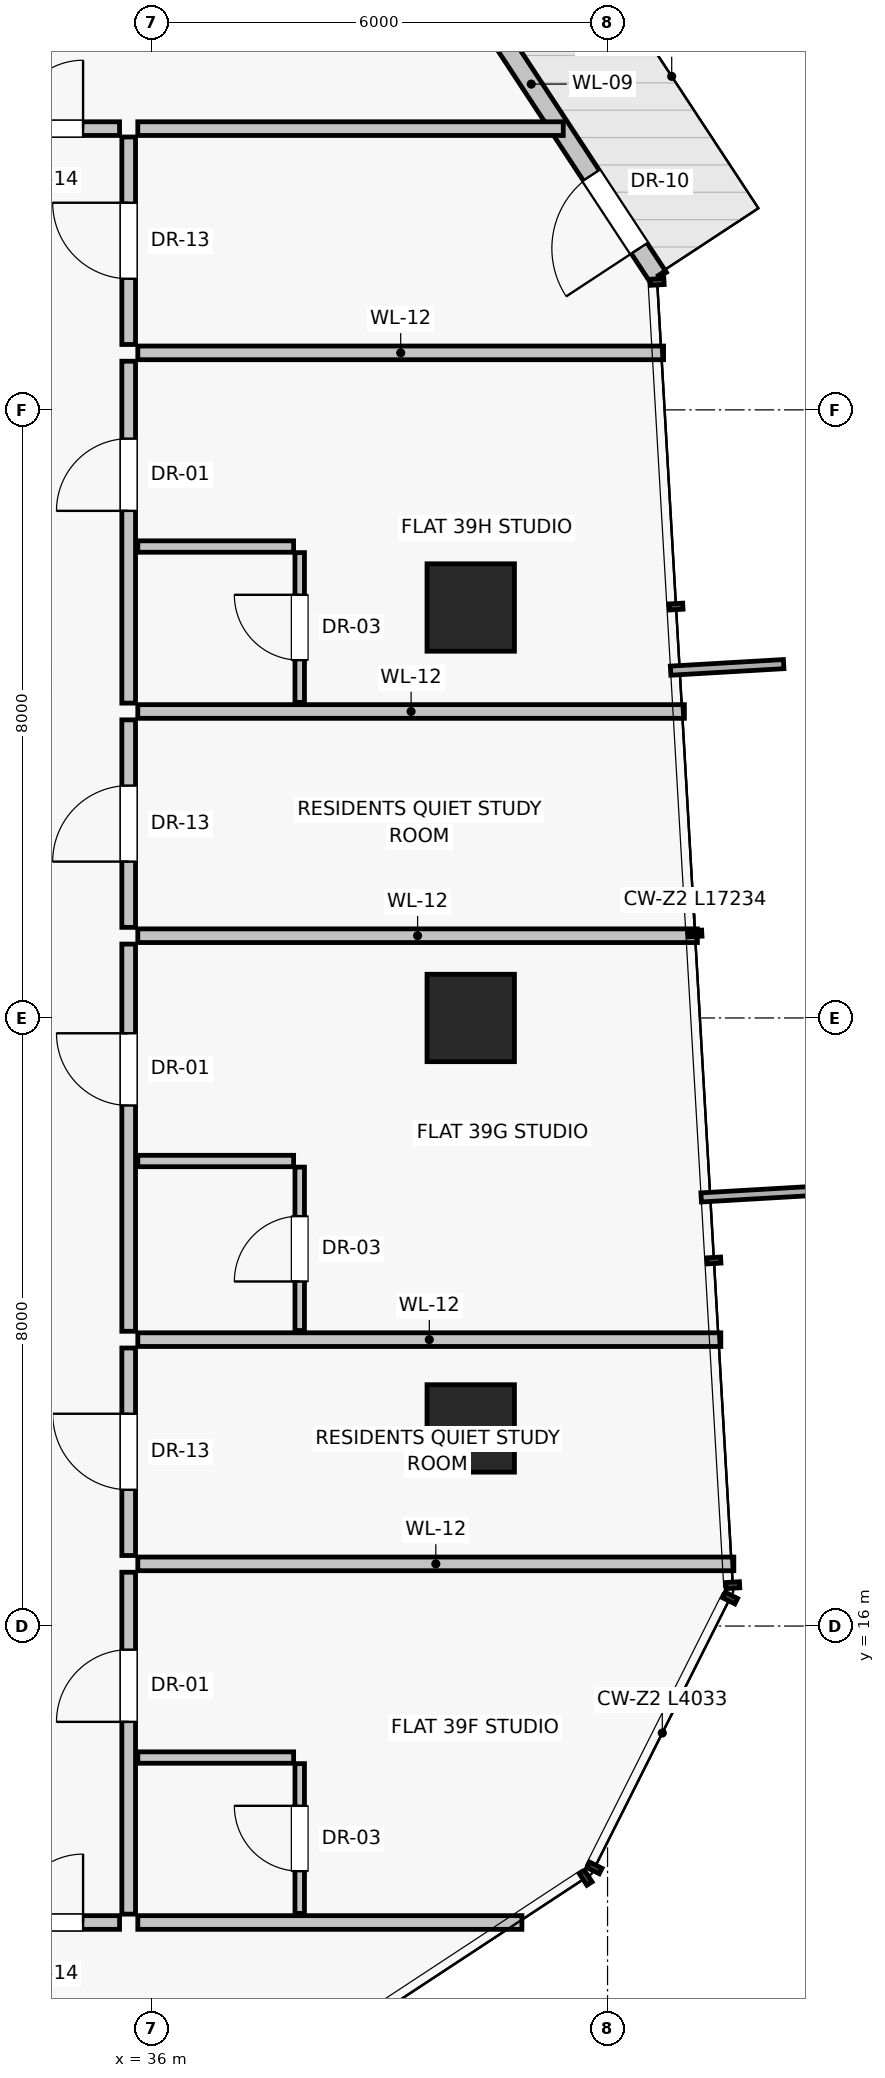
"""IFC4 building model, lengths in metres.
Left out: names, types, materials, properties, quantities, classifications, styles, units other than length and angle.
Written with IfcOpenShell. Run it as: python <this file> out.ifc"""

import sys

from ifc_helpers import new_model, si_unit, direction, frame, frame_2d, origin, origin_2d, place, context, subcontext, project, spatial, rectangle, extrude, source, transform, mapped, element, fill, save


model = new_model("IFC4")
c1 = context("Model", 3, precision=1e-05, world=origin(), true_north=direction((0.0, 1.0)))
c2 = subcontext(c1, "Body", "Model", "MODEL_VIEW")
j1 = project(units=[si_unit("LENGTHUNIT", "METRE"), si_unit("PLANEANGLEUNIT", "RADIAN")], contexts=[c1])
p1 = place(None, origin())
s1 = spatial("IfcSite", under=j1, at=p1, CompositionType="ELEMENT")
p2 = place(p1, origin())
s2 = spatial("IfcBuilding", under=s1, at=p2, CompositionType="ELEMENT")
p3 = place(p2, frame((0.0, 0.0, 139.25)))
s3 = spatial("IfcBuildingStorey", under=s2, at=p3, CompositionType="ELEMENT", Elevation=139.25)
for number, where, z_axis, x_axis in (
    (1, (40.2, 18.6, 0.0), (0.0, 0.0, 1.0), (1.0, 0.0, 0.0)),
    (2, (40.2, 24.0, 0.0), (0.0, 0.0, 1.0), (1.0, 0.0, 0.0)),
    (3, (40.2, 29.4, 0.0), (0.0, 0.0, 1.0), (1.0, 0.0, 0.0)),
):
    element("IfcColumn", number, at=place(p3, frame(where, z_axis=z_axis, x_axis=x_axis)), inside=s3, PredefinedType="COLUMN", context=c2, shape_type="SweptSolid", body=[
        extrude(rectangle(XDim=1.15, YDim=1.15, at=origin_2d()), origin(), (0.0, 0.0, 1.0), 3.25),
    ])
p4 = place(p3, frame((42.67, 33.74, 0.0), z_axis=(0.0, 0.0, 1.0), x_axis=(-0.54932518159, 0.835608667303, 0.0)))
e4 = element("IfcWall", 4, at=p4, inside=s3, PredefinedType="SOLIDWALL", context=c2, shape_type="SweptSolid", body=[
    extrude(rectangle(XDim=4.233, YDim=0.25, at=frame_2d((2.117, 0.0))), origin(), (0.0, 0.0, 1.0), 3.0),
])
p5 = place(p4, frame((0.46, 0.0, 0.0)))
e5 = element("IfcOpeningElement", 5, at=p5, cuts=e4, PredefinedType="OPENING", context=c2, shape_type="SweptSolid", body=[
    extrude(rectangle(XDim=1.15, YDim=2.25, at=frame_2d((0.575, 1.125))), frame((0.0, 0.135, 0.0), z_axis=(0.0, -1.0, 0.0), x_axis=(1.0, 0.0, 0.0)), (0.0, 0.0, 1.0), 0.27),
])
p6 = place(p3, frame((35.82, 12.1, 0.0), z_axis=(0.0, 0.0, 1.0), x_axis=(1.0, 0.0, 0.0)))
e6 = element("IfcWall", 6, at=p6, inside=s3, PredefinedType="PARTITIONING", context=c2, shape_type="SweptSolid", body=[
    extrude(rectangle(XDim=5.053, YDim=0.18, at=frame_2d((2.527, 0.0))), origin(), (0.0, 0.0, 1.0), 3.0),
])
p7 = place(p3, frame((35.82, 35.7, 0.0), z_axis=(0.0, 0.0, 1.0), x_axis=(1.0, 0.0, 0.0)))
e7 = element("IfcWall", 7, at=p7, inside=s3, PredefinedType="PARTITIONING", context=c2, shape_type="SweptSolid", body=[
    extrude(rectangle(XDim=5.597, YDim=0.18, at=frame_2d((2.799, 0.0))), origin(), (0.0, 0.0, 1.0), 3.0),
])
p8 = place(p3, frame((35.7, 16.928, 0.0), z_axis=(0.0, 0.0, 1.0), x_axis=(0.0, 1.0, 0.0)))
e8 = element("IfcWall", 8, at=p8, inside=s3, PredefinedType="PARTITIONING", context=c2, shape_type="SweptSolid", body=[
    extrude(rectangle(XDim=2.73, YDim=0.18, at=frame_2d((1.365, 0.0))), origin(), (0.0, 0.0, 1.0), 2.58),
])
p9 = place(p8, frame((0.865, 0.0, 0.0)))
e9 = element("IfcOpeningElement", 9, at=p9, cuts=e8, PredefinedType="OPENING", context=c2, shape_type="SweptSolid", body=[
    extrude(rectangle(XDim=1.0, YDim=2.01, at=frame_2d((0.5, 1.005))), frame((0.0, 0.1, 0.0), z_axis=(0.0, -1.0, 0.0), x_axis=(1.0, 0.0, 0.0)), (0.0, 0.0, 1.0), 0.2),
])
p10 = place(p3, frame((35.82, 16.818, 0.0), z_axis=(0.0, 0.0, 1.0), x_axis=(1.0, 0.0, 0.0)))
e10 = element("IfcWall", 10, at=p10, inside=s3, PredefinedType="PARTITIONING", context=c2, shape_type="SweptSolid", body=[
    extrude(rectangle(XDim=7.841, YDim=0.18, at=frame_2d((3.921, 0.0))), origin(), (0.0, 0.0, 1.0), 3.0),
])
p11 = place(p3, frame((35.7, 12.21, 0.0), z_axis=(0.0, 0.0, 1.0), x_axis=(0.0, 1.0, 0.0)))
e11 = element("IfcWall", 11, at=p11, inside=s3, PredefinedType="PARTITIONING", context=c2, shape_type="SweptSolid", body=[
    extrude(rectangle(XDim=4.498, YDim=0.18, at=frame_2d((2.249, 0.0))), origin(), (0.0, 0.0, 1.0), 3.0),
])
p12 = place(p11, frame((2.53, 0.0, 0.0)))
e12 = element("IfcOpeningElement", 12, at=p12, cuts=e11, PredefinedType="OPENING", context=c2, shape_type="SweptSolid", body=[
    extrude(rectangle(XDim=0.95, YDim=2.02, at=frame_2d((0.475, 1.01))), frame((0.0, 0.1, 0.0), z_axis=(0.0, -1.0, 0.0), x_axis=(1.0, 0.0, 0.0)), (0.0, 0.0, 1.0), 0.2),
])
p13 = place(p3, frame((35.82, 14.27, 0.0), z_axis=(0.0, 0.0, 1.0), x_axis=(1.0, 0.0, 0.0)))
e13 = element("IfcWall", 13, at=p13, inside=s3, PredefinedType="PARTITIONING", context=c2, shape_type="SweptSolid", body=[
    extrude(rectangle(XDim=2.05, YDim=0.15, at=frame_2d((1.025, 0.0))), origin(), (0.0, 0.0, 1.0), 3.0),
])
p14 = place(p3, frame((37.95, 12.22, 0.0), z_axis=(0.0, 0.0, 1.0), x_axis=(0.0, 1.0, 0.0)))
e14 = element("IfcWall", 14, at=p14, inside=s3, PredefinedType="PARTITIONING", context=c2, shape_type="SweptSolid", body=[
    extrude(rectangle(XDim=1.97, YDim=0.125, at=frame_2d((0.985, 0.0))), origin(), (0.0, 0.0, 1.0), 3.0),
])
p15 = place(p14, frame((0.555, 0.0, 0.0)))
e15 = element("IfcOpeningElement", 15, at=p15, cuts=e14, PredefinedType="OPENING", context=c2, shape_type="SweptSolid", body=[
    extrude(rectangle(XDim=0.86, YDim=2.01, at=frame_2d((0.43, 1.005))), frame((0.0, 0.073, 0.0), z_axis=(0.0, -1.0, 0.0), x_axis=(1.0, 0.0, 0.0)), (0.0, 0.0, 1.0), 0.145),
])
p16 = place(p3, frame((35.82, 19.768, 0.0), z_axis=(0.0, 0.0, 1.0), x_axis=(1.0, 0.0, 0.0)))
e16 = element("IfcWall", 16, at=p16, inside=s3, PredefinedType="PARTITIONING", context=c2, shape_type="SweptSolid", body=[
    extrude(rectangle(XDim=7.67, YDim=0.18, at=frame_2d((3.835, 0.0))), origin(), (0.0, 0.0, 1.0), 3.0),
])
p17 = place(p3, frame((35.7, 25.192, 0.0), z_axis=(0.0, 0.0, 1.0), x_axis=(0.0, 1.0, 0.0)))
e17 = element("IfcWall", 17, at=p17, inside=s3, PredefinedType="PARTITIONING", context=c2, shape_type="SweptSolid", body=[
    extrude(rectangle(XDim=2.73, YDim=0.18, at=frame_2d((1.365, 0.0))), origin(), (0.0, 0.0, 1.0), 2.58),
])
p18 = place(p17, frame((0.865, 0.0, 0.0)))
e18 = element("IfcOpeningElement", 18, at=p18, cuts=e17, PredefinedType="OPENING", context=c2, shape_type="SweptSolid", body=[
    extrude(rectangle(XDim=1.0, YDim=2.01, at=frame_2d((0.5, 1.005))), frame((0.0, 0.1, 0.0), z_axis=(0.0, -1.0, 0.0), x_axis=(1.0, 0.0, 0.0)), (0.0, 0.0, 1.0), 0.2),
])
p19 = place(p3, frame((35.82, 25.082, 0.0), z_axis=(0.0, 0.0, 1.0), x_axis=(1.0, 0.0, 0.0)))
e19 = element("IfcWall", 19, at=p19, inside=s3, PredefinedType="PARTITIONING", context=c2, shape_type="SweptSolid", body=[
    extrude(rectangle(XDim=7.362, YDim=0.18, at=frame_2d((3.681, 0.0))), origin(), (0.0, 0.0, 1.0), 3.0),
])
p20 = place(p3, frame((35.7, 19.878, 0.0), z_axis=(0.0, 0.0, 1.0), x_axis=(0.0, 1.0, 0.0)))
e20 = element("IfcWall", 20, at=p20, inside=s3, PredefinedType="PARTITIONING", context=c2, shape_type="SweptSolid", body=[
    extrude(rectangle(XDim=5.094, YDim=0.18, at=frame_2d((2.547, 0.0))), origin(), (0.0, 0.0, 1.0), 2.58),
])
p21 = place(p20, frame((2.971, 0.0, 0.0)))
e21 = element("IfcOpeningElement", 21, at=p21, cuts=e20, PredefinedType="OPENING", context=c2, shape_type="SweptSolid", body=[
    extrude(rectangle(XDim=0.95, YDim=2.02, at=frame_2d((0.475, 1.01))), frame((0.0, 0.1, 0.0), z_axis=(0.0, -1.0, 0.0), x_axis=(1.0, 0.0, 0.0)), (0.0, 0.0, 1.0), 0.2),
])
p22 = place(p3, frame((35.82, 22.118, 0.0), z_axis=(0.0, 0.0, 1.0), x_axis=(1.0, 0.0, 0.0)))
e22 = element("IfcWall", 22, at=p22, inside=s3, PredefinedType="PARTITIONING", context=c2, shape_type="SweptSolid", body=[
    extrude(rectangle(XDim=2.05, YDim=0.15, at=frame_2d((1.025, 0.0))), origin(), (0.0, 0.0, 1.0), 3.0),
])
p23 = place(p3, frame((37.95, 19.888, 0.0), z_axis=(0.0, 0.0, 1.0), x_axis=(0.0, 1.0, 0.0)))
e23 = element("IfcWall", 23, at=p23, inside=s3, PredefinedType="PARTITIONING", context=c2, shape_type="SweptSolid", body=[
    extrude(rectangle(XDim=2.15, YDim=0.125, at=frame_2d((1.075, 0.0))), origin(), (0.0, 0.0, 1.0), 3.0),
])
p24 = place(p23, frame((0.645, 0.0, 0.0)))
e24 = element("IfcOpeningElement", 24, at=p24, cuts=e23, PredefinedType="OPENING", context=c2, shape_type="SweptSolid", body=[
    extrude(rectangle(XDim=0.86, YDim=2.01, at=frame_2d((0.43, 1.005))), frame((0.0, 0.073, 0.0), z_axis=(0.0, -1.0, 0.0), x_axis=(1.0, 0.0, 0.0)), (0.0, 0.0, 1.0), 0.145),
])
p25 = place(p3, frame((35.82, 28.032, 0.0), z_axis=(0.0, 0.0, 1.0), x_axis=(1.0, 0.0, 0.0)))
e25 = element("IfcWall", 25, at=p25, inside=s3, PredefinedType="PARTITIONING", context=c2, shape_type="SweptSolid", body=[
    extrude(rectangle(XDim=7.191, YDim=0.18, at=frame_2d((3.595, 0.0))), origin(), (0.0, 0.0, 1.0), 3.0),
])
p26 = place(p3, frame((35.7, 32.86, 0.0), z_axis=(0.0, 0.0, 1.0), x_axis=(0.0, 1.0, 0.0)))
e26 = element("IfcWall", 26, at=p26, inside=s3, PredefinedType="PARTITIONING", context=c2, shape_type="SweptSolid", body=[
    extrude(rectangle(XDim=2.73, YDim=0.18, at=frame_2d((1.365, 0.0))), origin(), (0.0, 0.0, 1.0), 3.0),
])
p27 = place(p26, frame((0.865, 0.0, 0.0)))
e27 = element("IfcOpeningElement", 27, at=p27, cuts=e26, PredefinedType="OPENING", context=c2, shape_type="SweptSolid", body=[
    extrude(rectangle(XDim=1.0, YDim=2.01, at=frame_2d((0.5, 1.005))), frame((0.0, 0.1, 0.0), z_axis=(0.0, -1.0, 0.0), x_axis=(1.0, 0.0, 0.0)), (0.0, 0.0, 1.0), 0.2),
])
p28 = place(p3, frame((35.82, 32.75, 0.0), z_axis=(0.0, 0.0, 1.0), x_axis=(1.0, 0.0, 0.0)))
e28 = element("IfcWall", 28, at=p28, inside=s3, PredefinedType="PARTITIONING", context=c2, shape_type="SweptSolid", body=[
    extrude(rectangle(XDim=6.917, YDim=0.18, at=frame_2d((3.458, 0.0))), origin(), (0.0, 0.0, 1.0), 3.0),
])
p29 = place(p3, frame((35.7, 28.142, 0.0), z_axis=(0.0, 0.0, 1.0), x_axis=(0.0, 1.0, 0.0)))
e29 = element("IfcWall", 29, at=p29, inside=s3, PredefinedType="PARTITIONING", context=c2, shape_type="SweptSolid", body=[
    extrude(rectangle(XDim=4.498, YDim=0.18, at=frame_2d((2.249, 0.0))), origin(), (0.0, 0.0, 1.0), 2.58),
])
p30 = place(p29, frame((2.53, 0.0, 0.0)))
e30 = element("IfcOpeningElement", 30, at=p30, cuts=e29, PredefinedType="OPENING", context=c2, shape_type="SweptSolid", body=[
    extrude(rectangle(XDim=0.95, YDim=2.02, at=frame_2d((0.475, 1.01))), frame((0.0, 0.1, 0.0), z_axis=(0.0, -1.0, 0.0), x_axis=(1.0, 0.0, 0.0)), (0.0, 0.0, 1.0), 0.2),
])
p31 = place(p3, frame((35.82, 30.202, 0.0), z_axis=(0.0, 0.0, 1.0), x_axis=(1.0, 0.0, 0.0)))
e31 = element("IfcWall", 31, at=p31, inside=s3, PredefinedType="PARTITIONING", context=c2, shape_type="SweptSolid", body=[
    extrude(rectangle(XDim=2.05, YDim=0.15, at=frame_2d((1.025, 0.0))), origin(), (0.0, 0.0, 1.0), 2.378),
])
p32 = place(p3, frame((37.95, 28.152, 0.0), z_axis=(0.0, 0.0, 1.0), x_axis=(0.0, 1.0, 0.0)))
e32 = element("IfcWall", 32, at=p32, inside=s3, PredefinedType="PARTITIONING", context=c2, shape_type="SweptSolid", body=[
    extrude(rectangle(XDim=1.97, YDim=0.125, at=frame_2d((0.985, 0.0))), origin(), (0.0, 0.0, 1.0), 3.0),
])
p33 = place(p32, frame((0.555, 0.0, 0.0)))
e33 = element("IfcOpeningElement", 33, at=p33, cuts=e32, PredefinedType="OPENING", context=c2, shape_type="SweptSolid", body=[
    extrude(rectangle(XDim=0.86, YDim=2.01, at=frame_2d((0.43, 1.005))), frame((0.0, 0.073, 0.0), z_axis=(0.0, -1.0, 0.0), x_axis=(1.0, 0.0, 0.0)), (0.0, 0.0, 1.0), 0.145),
])
p34 = place(p3, frame((33.72, 12.1, 0.0), z_axis=(0.0, 0.0, 1.0), x_axis=(1.0, 0.0, 0.0)))
e34 = element("IfcWall", 34, at=p34, inside=s3, PredefinedType="PARTITIONING", context=c2, shape_type="SweptSolid", body=[
    extrude(rectangle(XDim=1.86, YDim=0.18, at=frame_2d((0.93, 0.0))), origin(), (0.0, 0.0, 1.0), 3.0),
])
p35 = place(p34, frame((0.48, 0.0, 0.0)))
e35 = element("IfcOpeningElement", 35, at=p35, cuts=e34, PredefinedType="OPENING", context=c2, shape_type="SweptSolid", body=[
    extrude(rectangle(XDim=0.9, YDim=2.01, at=frame_2d((0.45, 1.005))), frame((0.0, 0.1, 0.0), z_axis=(0.0, -1.0, 0.0), x_axis=(1.0, 0.0, 0.0)), (0.0, 0.0, 1.0), 0.2),
])
p36 = place(p3, frame((33.72, 35.7, 0.0), z_axis=(0.0, 0.0, 1.0), x_axis=(1.0, 0.0, 0.0)))
e36 = element("IfcWall", 36, at=p36, inside=s3, PredefinedType="PARTITIONING", context=c2, shape_type="SweptSolid", body=[
    extrude(rectangle(XDim=1.86, YDim=0.18, at=frame_2d((0.93, 0.0))), origin(), (0.0, 0.0, 1.0), 3.0),
])
p37 = place(p36, frame((0.48, 0.0, 0.0)))
e37 = element("IfcOpeningElement", 37, at=p37, cuts=e36, PredefinedType="OPENING", context=c2, shape_type="SweptSolid", body=[
    extrude(rectangle(XDim=0.9, YDim=2.01, at=frame_2d((0.45, 1.005))), frame((0.0, 0.1, 0.0), z_axis=(0.0, -1.0, 0.0), x_axis=(1.0, 0.0, 0.0)), (0.0, 0.0, 1.0), 0.2),
])
m1 = source(origin(), c2, "Body", "SweptSolid", [
    extrude(rectangle(XDim=1.15, YDim=2.25, at=frame_2d((0.575, 1.125))), frame((0.0, 0.025, 0.0), z_axis=(0.0, -1.0, 0.0), x_axis=(1.0, 0.0, 0.0)), (0.0, 0.0, 1.0), 0.05),
])
p38 = place(p5, frame((1.15, 0.0, 0.0), z_axis=(0.0, 0.0, 1.0), x_axis=(-1.0, 0.0, 0.0)))
e38 = element("IfcDoor", 38, at=p38, inside=s3, OperationType="SINGLE_SWING_LEFT", PredefinedType="DOOR", context=c2, shape_type="MappedRepresentation", body=[
    mapped(m1, transform((0.0, 0.0, 0.0), scale=1.0)),
])
fill(e5, e38)
m2 = source(origin(), c2, "Body", "SweptSolid", [
    extrude(rectangle(XDim=1.0, YDim=2.01, at=frame_2d((0.5, 1.005))), frame((0.0, 0.025, 0.0), z_axis=(0.0, -1.0, 0.0), x_axis=(1.0, 0.0, 0.0)), (0.0, 0.0, 1.0), 0.05),
])
p39 = place(p9, origin())
e39 = element("IfcDoor", 39, at=p39, inside=s3, OperationType="SINGLE_SWING_RIGHT", PredefinedType="DOOR", context=c2, shape_type="MappedRepresentation", body=[
    mapped(m2, transform((0.0, 0.0, 0.0), scale=1.0)),
])
fill(e9, e39)
m3 = source(origin(), c2, "Body", "SweptSolid", [
    extrude(rectangle(XDim=0.95, YDim=2.02, at=frame_2d((0.475, 1.01))), frame((0.0, 0.025, 0.0), z_axis=(0.0, -1.0, 0.0), x_axis=(1.0, 0.0, 0.0)), (0.0, 0.0, 1.0), 0.05),
])
p40 = place(p12, origin())
e40 = element("IfcDoor", 40, at=p40, inside=s3, OperationType="SINGLE_SWING_LEFT", PredefinedType="DOOR", context=c2, shape_type="MappedRepresentation", body=[
    mapped(m3, transform((0.0, 0.0, 0.0), scale=1.0)),
])
fill(e12, e40)
m4 = source(origin(), c2, "Body", "SweptSolid", [
    extrude(rectangle(XDim=0.86, YDim=2.01, at=frame_2d((0.43, 1.005))), frame((0.0, 0.025, 0.0), z_axis=(0.0, -1.0, 0.0), x_axis=(1.0, 0.0, 0.0)), (0.0, 0.0, 1.0), 0.05),
])
p41 = place(p15, origin())
e41 = element("IfcDoor", 41, at=p41, inside=s3, OperationType="SINGLE_SWING_RIGHT", PredefinedType="DOOR", context=c2, shape_type="MappedRepresentation", body=[
    mapped(m4, transform((0.0, 0.0, 0.0), scale=1.0)),
])
fill(e15, e41)
p42 = place(p18, origin())
e42 = element("IfcDoor", 42, at=p42, inside=s3, OperationType="SINGLE_SWING_LEFT", PredefinedType="DOOR", context=c2, shape_type="MappedRepresentation", body=[
    mapped(m2, transform((0.0, 0.0, 0.0), scale=1.0)),
])
fill(e18, e42)
p43 = place(p21, origin())
e43 = element("IfcDoor", 43, at=p43, inside=s3, OperationType="SINGLE_SWING_RIGHT", PredefinedType="DOOR", context=c2, shape_type="MappedRepresentation", body=[
    mapped(m3, transform((0.0, 0.0, 0.0), scale=1.0)),
])
fill(e21, e43)
p44 = place(p24, origin())
e44 = element("IfcDoor", 44, at=p44, inside=s3, OperationType="SINGLE_SWING_LEFT", PredefinedType="DOOR", context=c2, shape_type="MappedRepresentation", body=[
    mapped(m4, transform((0.0, 0.0, 0.0), scale=1.0)),
])
fill(e24, e44)
p45 = place(p27, origin())
e45 = element("IfcDoor", 45, at=p45, inside=s3, OperationType="SINGLE_SWING_RIGHT", PredefinedType="DOOR", context=c2, shape_type="MappedRepresentation", body=[
    mapped(m2, transform((0.0, 0.0, 0.0), scale=1.0)),
])
fill(e27, e45)
p46 = place(p30, origin())
e46 = element("IfcDoor", 46, at=p46, inside=s3, OperationType="SINGLE_SWING_LEFT", PredefinedType="DOOR", context=c2, shape_type="MappedRepresentation", body=[
    mapped(m3, transform((0.0, 0.0, 0.0), scale=1.0)),
])
fill(e30, e46)
p47 = place(p33, origin())
e47 = element("IfcDoor", 47, at=p47, inside=s3, OperationType="SINGLE_SWING_RIGHT", PredefinedType="DOOR", context=c2, shape_type="MappedRepresentation", body=[
    mapped(m4, transform((0.0, 0.0, 0.0), scale=1.0)),
])
fill(e33, e47)
m5 = source(origin(), c2, "Body", "SweptSolid", [
    extrude(rectangle(XDim=0.9, YDim=2.01, at=frame_2d((0.45, 1.005))), frame((0.0, 0.025, 0.0), z_axis=(0.0, -1.0, 0.0), x_axis=(1.0, 0.0, 0.0)), (0.0, 0.0, 1.0), 0.05),
])
p48 = place(p35, origin())
e48 = element("IfcDoor", 48, at=p48, inside=s3, OperationType="SINGLE_SWING_RIGHT", PredefinedType="DOOR", context=c2, shape_type="MappedRepresentation", body=[
    mapped(m5, transform((0.0, 0.0, 0.0), scale=1.0)),
])
fill(e35, e48)
p49 = place(p37, origin())
e49 = element("IfcDoor", 49, at=p49, inside=s3, OperationType="SINGLE_SWING_RIGHT", PredefinedType="DOOR", context=c2, shape_type="MappedRepresentation", body=[
    mapped(m5, transform((0.0, 0.0, 0.0), scale=1.0)),
])
fill(e37, e49)
save(model, sys.argv[1])
